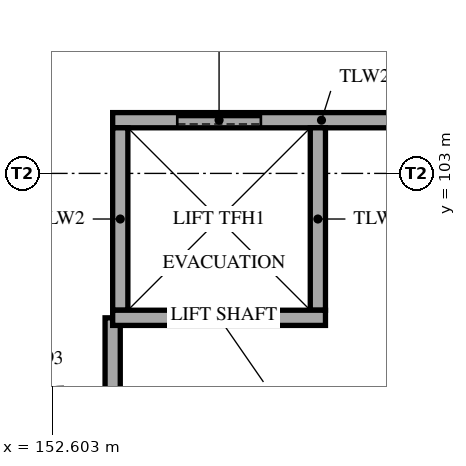
"""IFC4 building model, lengths in metres.
Left out: names, types, materials, properties, quantities, classifications, styles, units other than length and angle.
Written with IfcOpenShell. Run it as: python <this file> out.ifc"""

import sys

from ifc_helpers import new_model, si_unit, direction, frame, frame_2d, origin, place, context, subcontext, project, spatial, rectangle, extrude, element, fill, save


model = new_model("IFC4")
c1 = context("Model", 3, precision=1e-05, world=origin(), true_north=direction((0.0, 1.0)))
c2 = subcontext(c1, "Body", "Model", "MODEL_VIEW")
j1 = project(units=[si_unit("LENGTHUNIT", "METRE"), si_unit("PLANEANGLEUNIT", "RADIAN")], contexts=[c1])
p1 = place(None, origin())
s1 = spatial("IfcSite", under=j1, at=p1, CompositionType="ELEMENT")
p2 = place(p1, origin())
s2 = spatial("IfcBuilding", under=s1, at=p2, CompositionType="ELEMENT")
p3 = place(p2, frame((0.0, 0.0, 15.0)))
s3 = spatial("IfcBuildingStorey", under=s2, at=p3, CompositionType="ELEMENT", Elevation=15.0)
p4 = place(p3, frame((153.4, 103.7, 0.0), z_axis=(0.0, 0.0, 1.0), x_axis=(1.0, 0.0, 0.0)))
e1 = element("IfcWall", 1, at=p4, inside=s3, PredefinedType="SOLIDWALL", context=c2, shape_type="SweptSolid", body=[
    extrude(rectangle(XDim=5.495, YDim=0.2, at=frame_2d((2.748, 0.0))), origin(), (0.0, 0.0, 1.0), 3.79),
])
p5 = place(p4, frame((0.85, 0.0, 0.0)))
e2 = element("IfcOpeningElement", 2, at=p5, cuts=e1, PredefinedType="OPENING", context=c2, shape_type="SweptSolid", body=[
    extrude(rectangle(XDim=1.1, YDim=2.1, at=frame_2d((0.55, 1.05))), frame((0.0, 0.11, 0.0), z_axis=(0.0, -1.0, 0.0), x_axis=(1.0, 0.0, 0.0)), (0.0, 0.0, 1.0), 0.22),
])
p6 = place(p3, frame((153.4, 99.1, 0.0), z_axis=(0.0, 0.0, 1.0), x_axis=(0.0, 1.0, 0.0)))
e3 = element("IfcWall", 3, at=p6, inside=s3, PredefinedType="SOLIDWALL", context=c2, shape_type="SweptSolid", body=[
    extrude(rectangle(XDim=2.0, YDim=0.2, at=frame_2d((1.0, 0.0))), origin(), (0.0, 0.0, 1.0), 3.79),
])
for number, where, z_axis, x_axis in (
    (4, (153.5, 101.2, 0.0), (0.0, 0.0, 1.0), (0.0, 1.0, 0.0)),
    (5, (156.1, 101.2, 0.0), (0.0, 0.0, 1.0), (0.0, 1.0, 0.0)),
):
    element("IfcWall", number, at=place(p3, frame(where, z_axis=z_axis, x_axis=x_axis)), inside=s3, PredefinedType="SOLIDWALL", context=c2, shape_type="SweptSolid", body=[
        extrude(rectangle(XDim=2.4, YDim=0.2, at=frame_2d((1.2, 0.0))), origin(), (0.0, 0.0, 1.0), 3.79),
    ])
p7 = place(p3, frame((153.4, 101.1, 0.0), z_axis=(0.0, 0.0, 1.0), x_axis=(1.0, 0.0, 0.0)))
e6 = element("IfcWall", 6, at=p7, inside=s3, PredefinedType="SOLIDWALL", context=c2, shape_type="SweptSolid", body=[
    extrude(rectangle(XDim=2.8, YDim=0.2, at=frame_2d((1.4, 0.0))), origin(), (0.0, 0.0, 1.0), 3.79),
])
p8 = place(p5, origin())
e7 = element("IfcDoor", 7, at=p8, inside=s3, OperationType="SLIDING_TO_LEFT", PredefinedType="DOOR", context=c2, shape_type="SweptSolid", body=[
    extrude(rectangle(XDim=1.1, YDim=2.1, at=frame_2d((0.55, 1.05))), frame((0.0, 0.025, 0.0), z_axis=(0.0, -1.0, 0.0), x_axis=(1.0, 0.0, 0.0)), (0.0, 0.0, 1.0), 0.05),
])
fill(e2, e7)
save(model, sys.argv[1])
